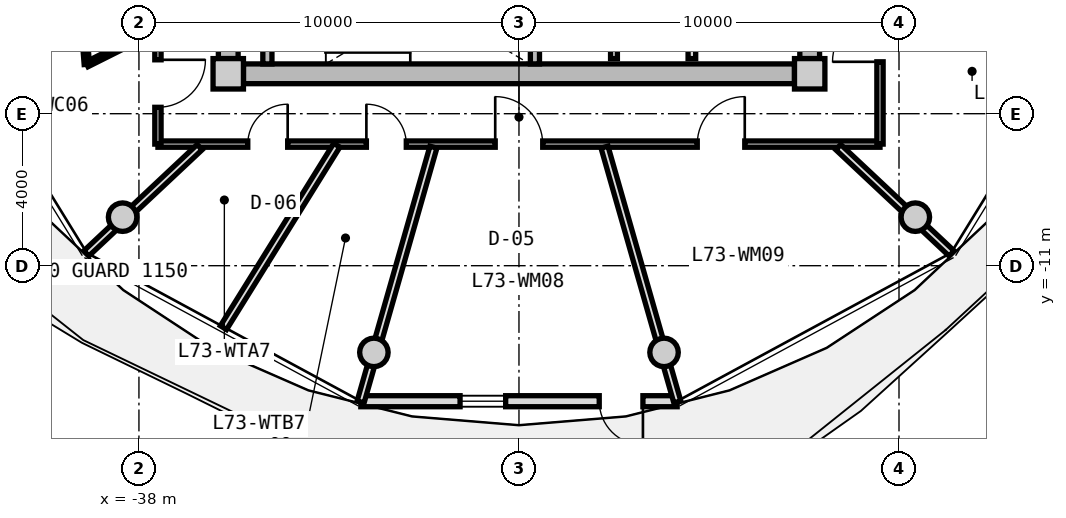
"""IFC4 building model, lengths in metres.
Left out: names, types, materials, properties, quantities, classifications, styles, units other than length and angle.
Written with IfcOpenShell. Run it as: python <this file> out.ifc"""

import sys

from ifc_helpers import new_model, si_unit, direction, frame, frame_2d, origin, origin_2d, place, context, subcontext, project, spatial, rectangle, circle, extrude, source, transform, mapped, element, fill, save


model = new_model("IFC4")
c1 = context("Model", 3, precision=1e-05, world=origin(), true_north=direction((0.0, 1.0)))
c2 = subcontext(c1, "Body", "Model", "MODEL_VIEW")
j1 = project(units=[si_unit("LENGTHUNIT", "METRE"), si_unit("PLANEANGLEUNIT", "RADIAN")], contexts=[c1])
p1 = place(None, origin())
s1 = spatial("IfcSite", under=j1, at=p1, CompositionType="ELEMENT")
p2 = place(p1, origin())
s2 = spatial("IfcBuilding", under=s1, at=p2, CompositionType="ELEMENT")
p3 = place(p2, frame((0.0, 0.0, 235.25)))
s3 = spatial("IfcBuildingStorey", under=s2, at=p3, CompositionType="ELEMENT", Elevation=235.25)
m1 = source(origin(), c2, "Body", "SweptSolid", [
    extrude(rectangle(XDim=0.8, YDim=0.8, at=origin_2d()), origin(), (0.0, 0.0, 1.0), 3.05),
])
for number, where, z_axis, x_axis in (
    (1, (-35.65, -5.95, 0.0), (0.0, 0.0, 1.0), (1.0, 0.0, 0.0)),
    (2, (-20.35, -5.95, 0.0), (0.0, 0.0, 1.0), (1.0, 0.0, 0.0)),
):
    element("IfcColumn", number, at=place(p3, frame(where, z_axis=z_axis, x_axis=x_axis)), inside=s3, PredefinedType="COLUMN", context=c2, shape_type="MappedRepresentation", body=[
        mapped(m1, transform((0.0, 0.0, 0.0), x_axis=(1.0, 0.0, 0.0), y_axis=(0.0, 1.0, 0.0), z_axis=(0.0, 0.0, 1.0), scale=1.0)),
    ])
m2 = source(origin(), c2, "Body", "SweptSolid", [
    extrude(rectangle(XDim=14.5, YDim=0.52, at=frame_2d((7.25, 0.0))), origin(), (0.0, 0.0, 1.0), 2.81),
])
p4 = place(p3, frame((-20.75, -5.95, 0.0), z_axis=(0.0, 0.0, 1.0), x_axis=(-1.0, 0.0, 0.0)))
e3 = element("IfcWall", 3, at=p4, inside=s3, PredefinedType="SHEAR", context=c2, shape_type="MappedRepresentation", body=[
    mapped(m2, transform((0.0, 0.0, 0.0), x_axis=(1.0, 0.0, 0.0), y_axis=(0.0, 1.0, 0.0), z_axis=(0.0, 0.0, 1.0), scale=1.0)),
])
m3 = source(origin(), c2, "Body", "SweptSolid", [
    extrude(rectangle(XDim=11.1, YDim=0.52, at=frame_2d((5.55, 0.0))), origin(), (0.0, 0.0, 1.0), 2.81),
])
p5 = place(p3, frame((-35.65, -5.55, 0.0), z_axis=(0.0, 0.0, 1.0), x_axis=(0.0, 1.0, 0.0)))
e4 = element("IfcWall", 4, at=p5, inside=s3, PredefinedType="SHEAR", context=c2, shape_type="MappedRepresentation", body=[
    mapped(m3, transform((0.0, 0.0, 0.0), x_axis=(1.0, 0.0, 0.0), y_axis=(0.0, 1.0, 0.0), z_axis=(0.0, 0.0, 1.0), scale=1.0)),
])
p6 = place(p5, frame((3.8, 0.0, 0.0)))
e5 = element("IfcOpeningElement", 5, at=p6, cuts=e4, PredefinedType="OPENING", context=c2, shape_type="SweptSolid", body=[
    extrude(rectangle(XDim=1.2, YDim=2.15, at=frame_2d((0.6, 1.075))), frame((0.0, 0.27, 0.0), z_axis=(0.0, -1.0, 0.0), x_axis=(1.0, 0.0, 0.0)), (0.0, 0.0, 1.0), 0.54),
])
p7 = place(p3, frame((-20.35, 5.55, 0.0), z_axis=(0.0, 0.0, 1.0), x_axis=(0.0, -1.0, 0.0)))
e6 = element("IfcWall", 6, at=p7, inside=s3, PredefinedType="SHEAR", context=c2, shape_type="MappedRepresentation", body=[
    mapped(m3, transform((0.0, 0.0, 0.0), x_axis=(1.0, 0.0, 0.0), y_axis=(0.0, 1.0, 0.0), z_axis=(0.0, 0.0, 1.0), scale=1.0)),
])
p8 = place(p7, frame((5.65, 0.0, 0.0)))
e7 = element("IfcOpeningElement", 7, at=p8, cuts=e6, PredefinedType="OPENING", context=c2, shape_type="SweptSolid", body=[
    extrude(rectangle(XDim=1.2, YDim=2.15, at=frame_2d((0.6, 1.075))), frame((0.0, 0.27, 0.0), z_axis=(0.0, -1.0, 0.0), x_axis=(1.0, 0.0, 0.0)), (0.0, 0.0, 1.0), 0.54),
])
m4 = source(origin(), c2, "Body", "SweptSolid", [
    extrude(circle(Radius=0.375, at=origin_2d()), origin(), (0.0, 0.0, 1.0), 3.05),
])
for number, where, z_axis, x_axis in (
    (8, (-38.43, -9.723, 0.0), (0.0, 0.0, 1.0), (1.0, 0.0, 0.0)),
    (9, (-31.818, -13.281, 0.0), (0.0, 0.0, 1.0), (1.0, 0.0, 0.0)),
    (10, (-24.182, -13.281, 0.0), (0.0, 0.0, 1.0), (1.0, 0.0, 0.0)),
    (11, (-17.57, -9.723, 0.0), (0.0, 0.0, 1.0), (1.0, 0.0, 0.0)),
):
    element("IfcColumn", number, at=place(p3, frame(where, z_axis=z_axis, x_axis=x_axis)), inside=s3, PredefinedType="COLUMN", context=c2, shape_type="MappedRepresentation", body=[
        mapped(m4, transform((0.0, 0.0, 0.0), x_axis=(1.0, 0.0, 0.0), y_axis=(0.0, 1.0, 0.0), z_axis=(0.0, 0.0, 1.0), scale=1.0)),
    ])
m5 = source(origin(), c2, "Body", "SweptSolid", [
    extrude(rectangle(XDim=8.324, YDim=0.29, at=frame_2d((4.162, 0.0))), origin(), (0.0, 0.0, 1.0), 2.81),
])
p9 = place(p3, frame((-23.838, -14.566, 0.0), z_axis=(0.0, 0.0, 1.0), x_axis=(-1.0, 0.0, 0.0)))
e12 = element("IfcWall", 12, at=p9, inside=s3, PredefinedType="SOLIDWALL", context=c2, shape_type="MappedRepresentation", body=[
    mapped(m5, transform((0.0, 0.0, 0.0), x_axis=(1.0, 0.0, 0.0), y_axis=(0.0, 1.0, 0.0), z_axis=(0.0, 0.0, 1.0), scale=1.0)),
])
p10 = place(p9, frame((0.9, 0.0, 0.0)))
e13 = element("IfcOpeningElement", 13, at=p10, cuts=e12, PredefinedType="OPENING", context=c2, shape_type="SweptSolid", body=[
    extrude(rectangle(XDim=1.15, YDim=2.25, at=frame_2d((0.575, 1.125))), frame((0.0, 0.155, 0.0), z_axis=(0.0, -1.0, 0.0), x_axis=(1.0, 0.0, 0.0)), (0.0, 0.0, 1.0), 0.31),
])
p11 = place(p9, frame((4.512, 0.0, 0.85)))
e14 = element("IfcOpeningElement", 14, at=p11, cuts=e12, PredefinedType="OPENING", context=c2, shape_type="SweptSolid", body=[
    extrude(rectangle(XDim=1.2, YDim=1.5, at=frame_2d((0.6, 0.75))), frame((0.0, 0.155, 0.0), z_axis=(0.0, -1.0, 0.0), x_axis=(1.0, 0.0, 0.0)), (0.0, 0.0, 1.0), 0.31),
])
m6 = source(origin(), c2, "Body", "SweptSolid", [
    extrude(rectangle(XDim=3.24, YDim=0.24, at=frame_2d((1.62, 0.0))), origin(), (0.0, 0.0, 1.0), 2.81),
])
for number, where, z_axis, x_axis in (
    (15, (-34.62, -5.69, 0.0), (0.0, 0.0, 1.0), (0.0, 1.0, 0.0)),
    (16, (-27.58, -5.69, 0.0), (0.0, 0.0, 1.0), (0.0, 1.0, 0.0)),
):
    element("IfcWall", number, at=place(p3, frame(where, z_axis=z_axis, x_axis=x_axis)), inside=s3, PredefinedType="PARTITIONING", context=c2, shape_type="MappedRepresentation", body=[
        mapped(m6, transform((0.0, 0.0, 0.0), x_axis=(1.0, 0.0, 0.0), y_axis=(0.0, 1.0, 0.0), z_axis=(0.0, 0.0, 1.0), scale=1.0)),
    ])
m7 = source(origin(), c2, "Body", "SweptSolid", [
    extrude(rectangle(XDim=3.8, YDim=0.2, at=frame_2d((1.9, 0.0))), origin(), (0.0, 0.0, 1.0), 2.795),
])
p12 = place(p3, frame((-23.45, -5.55, 0.0), z_axis=(0.0, 0.0, 1.0), x_axis=(0.0, 1.0, 0.0)))
e17 = element("IfcWall", 17, at=p12, inside=s3, PredefinedType="PARTITIONING", context=c2, shape_type="MappedRepresentation", body=[
    mapped(m7, transform((0.0, 0.0, 0.0), x_axis=(1.0, 0.0, 0.0), y_axis=(0.0, 1.0, 0.0), z_axis=(0.0, 0.0, 1.0), scale=1.0)),
])
m8 = source(origin(), c2, "Body", "SweptSolid", [
    extrude(rectangle(XDim=4.2, YDim=0.18, at=frame_2d((2.1, 0.0))), origin(), (0.0, 0.0, 1.0), 2.795),
])
p13 = place(p3, frame((-25.5, -5.55, 0.0), z_axis=(0.0, 0.0, 1.0), x_axis=(0.0, 1.0, 0.0)))
e18 = element("IfcWall", 18, at=p13, inside=s3, PredefinedType="PARTITIONING", context=c2, shape_type="MappedRepresentation", body=[
    mapped(m8, transform((0.0, 0.0, 0.0), x_axis=(1.0, 0.0, 0.0), y_axis=(0.0, 1.0, 0.0), z_axis=(0.0, 0.0, 1.0), scale=1.0)),
])
m9 = source(origin(), c2, "Body", "SweptSolid", [
    extrude(rectangle(XDim=19.0, YDim=0.165, at=frame_2d((9.5, 0.0))), origin(), (0.0, 0.0, 1.0), 2.795),
])
p14 = place(p3, frame((-18.5, -7.8, 0.0), z_axis=(0.0, 0.0, 1.0), x_axis=(-1.0, 0.0, 0.0)))
e19 = element("IfcWall", 19, at=p14, inside=s3, PredefinedType="PARTITIONING", context=c2, shape_type="MappedRepresentation", body=[
    mapped(m9, transform((0.0, 0.0, 0.0), x_axis=(1.0, 0.0, 0.0), y_axis=(0.0, 1.0, 0.0), z_axis=(0.0, 0.0, 1.0), scale=1.0)),
])
p15 = place(p14, frame((15.586, 0.0, 0.0)))
e20 = element("IfcOpeningElement", 20, at=p15, cuts=e19, PredefinedType="OPENING", context=c2, shape_type="SweptSolid", body=[
    extrude(rectangle(XDim=1.05, YDim=2.15, at=frame_2d((0.525, 1.075))), frame((0.0, 0.093, 0.0), z_axis=(0.0, -1.0, 0.0), x_axis=(1.0, 0.0, 0.0)), (0.0, 0.0, 1.0), 0.185),
])
p16 = place(p14, frame((12.465, 0.0, 0.0)))
e21 = element("IfcOpeningElement", 21, at=p16, cuts=e19, PredefinedType="OPENING", context=c2, shape_type="SweptSolid", body=[
    extrude(rectangle(XDim=1.05, YDim=2.15, at=frame_2d((0.525, 1.075))), frame((0.0, 0.093, 0.0), z_axis=(0.0, -1.0, 0.0), x_axis=(1.0, 0.0, 0.0)), (0.0, 0.0, 1.0), 0.185),
])
p17 = place(p14, frame((8.875, 0.0, 0.0)))
e22 = element("IfcOpeningElement", 22, at=p17, cuts=e19, PredefinedType="OPENING", context=c2, shape_type="SweptSolid", body=[
    extrude(rectangle(XDim=1.25, YDim=2.2, at=frame_2d((0.625, 1.1))), frame((0.0, 0.093, 0.0), z_axis=(0.0, -1.0, 0.0), x_axis=(1.0, 0.0, 0.0)), (0.0, 0.0, 1.0), 0.185),
])
p18 = place(p14, frame((3.559, 0.0, 0.0)))
e23 = element("IfcOpeningElement", 23, at=p18, cuts=e19, PredefinedType="OPENING", context=c2, shape_type="SweptSolid", body=[
    extrude(rectangle(XDim=1.25, YDim=2.2, at=frame_2d((0.625, 1.1))), frame((0.0, 0.093, 0.0), z_axis=(0.0, -1.0, 0.0), x_axis=(1.0, 0.0, 0.0)), (0.0, 0.0, 1.0), 0.185),
])
m10 = source(origin(), c2, "Body", "SweptSolid", [
    extrude(rectangle(XDim=6.88, YDim=0.165, at=frame_2d((3.44, 0.0))), origin(), (0.0, 0.0, 1.0), 2.795),
])
p19 = place(p3, frame((-37.5, -7.8, 0.0), z_axis=(0.0, 0.0, 1.0), x_axis=(0.0, 1.0, 0.0)))
e24 = element("IfcWall", 24, at=p19, inside=s3, PredefinedType="PARTITIONING", context=c2, shape_type="MappedRepresentation", body=[
    mapped(m10, transform((0.0, 0.0, 0.0), x_axis=(1.0, 0.0, 0.0), y_axis=(0.0, 1.0, 0.0), z_axis=(0.0, 0.0, 1.0), scale=1.0)),
])
p20 = place(p19, frame((0.968, 0.0, 0.0)))
e25 = element("IfcOpeningElement", 25, at=p20, cuts=e24, PredefinedType="OPENING", context=c2, shape_type="SweptSolid", body=[
    extrude(rectangle(XDim=1.25, YDim=2.2, at=frame_2d((0.625, 1.1))), frame((0.0, 0.093, 0.0), z_axis=(0.0, -1.0, 0.0), x_axis=(1.0, 0.0, 0.0)), (0.0, 0.0, 1.0), 0.185),
])
p21 = place(p3, frame((-18.5, -0.92, 0.0), z_axis=(0.0, 0.0, 1.0), x_axis=(0.0, -1.0, 0.0)))
e26 = element("IfcWall", 26, at=p21, inside=s3, PredefinedType="PARTITIONING", context=c2, shape_type="MappedRepresentation", body=[
    mapped(m10, transform((0.0, 0.0, 0.0), x_axis=(1.0, 0.0, 0.0), y_axis=(0.0, 1.0, 0.0), z_axis=(0.0, 0.0, 1.0), scale=1.0)),
])
p22 = place(p21, frame((3.464, 0.0, 0.0)))
e27 = element("IfcOpeningElement", 27, at=p22, cuts=e26, PredefinedType="OPENING", context=c2, shape_type="SweptSolid", body=[
    extrude(rectangle(XDim=1.25, YDim=2.2, at=frame_2d((0.625, 1.1))), frame((0.0, 0.093, 0.0), z_axis=(0.0, -1.0, 0.0), x_axis=(1.0, 0.0, 0.0)), (0.0, 0.0, 1.0), 0.185),
])
m11 = source(origin(), c2, "Body", "SweptSolid", [
    extrude(rectangle(XDim=4.089, YDim=0.19, at=frame_2d((2.044, 0.0))), origin(), (0.0, 0.0, 1.0), 2.395),
])
p23 = place(p3, frame((-36.402, -7.88, 0.0), z_axis=(0.0, 0.0, 1.0), x_axis=(-0.729401273609, -0.684086092577, 0.0)))
e28 = element("IfcWall", 28, at=p23, inside=s3, PredefinedType="PARTITIONING", context=c2, shape_type="MappedRepresentation", body=[
    mapped(m11, transform((0.0, 0.0, 0.0), x_axis=(1.0, 0.0, 0.0), y_axis=(0.0, 1.0, 0.0), z_axis=(0.0, 0.0, 1.0), scale=1.0)),
])
m12 = source(origin(), c2, "Body", "SweptSolid", [
    extrude(rectangle(XDim=2.06, YDim=0.14, at=frame_2d((1.03, 0.0))), origin(), (0.0, 0.0, 1.0), 2.795),
])
p24 = place(p3, frame((-37.53, -4.778, 0.0), z_axis=(0.0, 0.0, 1.0), x_axis=(-0.893952568722, -0.448161583444, 0.0)))
e29 = element("IfcWall", 29, at=p24, inside=s3, PredefinedType="PARTITIONING", context=c2, shape_type="MappedRepresentation", body=[
    mapped(m12, transform((0.0, 0.0, 0.0), x_axis=(1.0, 0.0, 0.0), y_axis=(0.0, 1.0, 0.0), z_axis=(0.0, 0.0, 1.0), scale=1.0)),
])
m13 = source(origin(), c2, "Body", "SweptSolid", [
    extrude(rectangle(XDim=2.798, YDim=0.14, at=frame_2d((1.399, 0.0))), origin(), (0.0, 0.0, 1.0), 2.795),
])
p25 = place(p3, frame((-39.371, -5.701, 0.0), z_axis=(0.0, 0.0, 1.0), x_axis=(-0.077823984089, 0.996967114553, 0.0)))
e30 = element("IfcWall", 30, at=p25, inside=s3, PredefinedType="PARTITIONING", context=c2, shape_type="MappedRepresentation", body=[
    mapped(m13, transform((0.0, 0.0, 0.0), x_axis=(1.0, 0.0, 0.0), y_axis=(0.0, 1.0, 0.0), z_axis=(0.0, 0.0, 1.0), scale=1.0)),
])
p26 = place(p25, frame((0.939, 0.0, 0.0)))
e31 = element("IfcOpeningElement", 31, at=p26, cuts=e30, PredefinedType="OPENING", context=c2, shape_type="SweptSolid", body=[
    extrude(rectangle(XDim=0.92, YDim=2.1, at=frame_2d((0.46, 1.05))), frame((0.0, 0.08, 0.0), z_axis=(0.0, -1.0, 0.0), x_axis=(1.0, 0.0, 0.0)), (0.0, 0.0, 1.0), 0.16),
])
m14 = source(origin(), c2, "Body", "SweptSolid", [
    extrude(rectangle(XDim=6.974, YDim=0.19, at=frame_2d((3.487, 0.0))), origin(), (0.0, 0.0, 1.0), 2.395),
])
p27 = place(p3, frame((-30.251, -7.88, 0.0), z_axis=(0.0, 0.0, 1.0), x_axis=(-0.274707256801, -0.961527910703, 0.0)))
e32 = element("IfcWall", 32, at=p27, inside=s3, PredefinedType="PARTITIONING", context=c2, shape_type="MappedRepresentation", body=[
    mapped(m14, transform((0.0, 0.0, 0.0), x_axis=(1.0, 0.0, 0.0), y_axis=(0.0, 1.0, 0.0), z_axis=(0.0, 0.0, 1.0), scale=1.0)),
])
m15 = source(origin(), c2, "Body", "SweptSolid", [
    extrude(rectangle(XDim=5.652, YDim=0.19, at=frame_2d((2.826, 0.0))), origin(), (0.0, 0.0, 1.0), 2.795),
])
p28 = place(p3, frame((-32.794, -7.83, 0.0), z_axis=(0.0, 0.0, 1.0), x_axis=(-0.527566076956, -0.84951399897, 0.0)))
e33 = element("IfcWall", 33, at=p28, inside=s3, PredefinedType="PARTITIONING", context=c2, shape_type="MappedRepresentation", body=[
    mapped(m15, transform((0.0, 0.0, 0.0), x_axis=(1.0, 0.0, 0.0), y_axis=(0.0, 1.0, 0.0), z_axis=(0.0, 0.0, 1.0), scale=1.0)),
])
p29 = place(p3, frame((-25.749, -7.88, 0.0), z_axis=(0.0, 0.0, 1.0), x_axis=(0.274707256801, -0.961527910703, 0.0)))
e34 = element("IfcWall", 34, at=p29, inside=s3, PredefinedType="PARTITIONING", context=c2, shape_type="MappedRepresentation", body=[
    mapped(m14, transform((0.0, 0.0, 0.0), x_axis=(1.0, 0.0, 0.0), y_axis=(0.0, 1.0, 0.0), z_axis=(0.0, 0.0, 1.0), scale=1.0)),
])
p30 = place(p3, frame((-19.598, -7.88, 0.0), z_axis=(0.0, 0.0, 1.0), x_axis=(0.729401273609, -0.684086092577, 0.0)))
e35 = element("IfcWall", 35, at=p30, inside=s3, PredefinedType="PARTITIONING", context=c2, shape_type="MappedRepresentation", body=[
    mapped(m11, transform((0.0, 0.0, 0.0), x_axis=(1.0, 0.0, 0.0), y_axis=(0.0, 1.0, 0.0), z_axis=(0.0, 0.0, 1.0), scale=1.0)),
])
m16 = source(origin(), c2, "Body", "SweptSolid", [
    extrude(rectangle(XDim=1.15, YDim=2.25, at=frame_2d((0.575, 1.125))), frame((0.0, 0.025, 0.0), z_axis=(0.0, -1.0, 0.0), x_axis=(1.0, 0.0, 0.0)), (0.0, 0.0, 1.0), 0.05),
])
p31 = place(p10, origin())
e36 = element("IfcDoor", 36, at=p31, inside=s3, OperationType="SINGLE_SWING_LEFT", PredefinedType="DOOR", context=c2, shape_type="MappedRepresentation", body=[
    mapped(m16, transform((0.0, 0.0, 0.0), x_axis=(1.0, 0.0, 0.0), y_axis=(0.0, 1.0, 0.0), z_axis=(0.0, 0.0, 1.0), scale=1.0)),
])
fill(e13, e36)
m17 = source(origin(), c2, "Body", "SweptSolid", [
    extrude(rectangle(XDim=1.2, YDim=1.5, at=frame_2d((0.6, 0.75))), frame((0.0, 0.03, 0.0), z_axis=(0.0, -1.0, 0.0), x_axis=(1.0, 0.0, 0.0)), (0.0, 0.0, 1.0), 0.06),
])
p32 = place(p11, origin())
e37 = element("IfcWindow", 37, at=p32, inside=s3, PartitioningType="SINGLE_PANEL", PredefinedType="WINDOW", context=c2, shape_type="MappedRepresentation", body=[
    mapped(m17, transform((0.0, 0.0, 0.0), x_axis=(1.0, 0.0, 0.0), y_axis=(0.0, 1.0, 0.0), z_axis=(0.0, 0.0, 1.0), scale=1.0)),
])
fill(e14, e37)
m18 = source(origin(), c2, "Body", "SweptSolid", [
    extrude(rectangle(XDim=1.25, YDim=2.2, at=frame_2d((0.625, 1.1))), frame((0.0, 0.025, 0.0), z_axis=(0.0, -1.0, 0.0), x_axis=(1.0, 0.0, 0.0)), (0.0, 0.0, 1.0), 0.05),
])
p33 = place(p20, frame((1.25, 0.0, 0.0), z_axis=(0.0, 0.0, 1.0), x_axis=(-1.0, 0.0, 0.0)))
e38 = element("IfcDoor", 38, at=p33, inside=s3, OperationType="SINGLE_SWING_LEFT", PredefinedType="DOOR", context=c2, shape_type="MappedRepresentation", body=[
    mapped(m18, transform((0.0, 0.0, 0.0), x_axis=(1.0, 0.0, 0.0), y_axis=(0.0, 1.0, 0.0), z_axis=(0.0, 0.0, 1.0), scale=1.0)),
])
fill(e25, e38)
m19 = source(origin(), c2, "Body", "SweptSolid", [
    extrude(rectangle(XDim=1.05, YDim=2.15, at=frame_2d((0.525, 1.075))), frame((0.0, 0.025, 0.0), z_axis=(0.0, -1.0, 0.0), x_axis=(1.0, 0.0, 0.0)), (0.0, 0.0, 1.0), 0.05),
])
p34 = place(p15, frame((1.05, 0.0, 0.0), z_axis=(0.0, 0.0, 1.0), x_axis=(-1.0, 0.0, 0.0)))
e39 = element("IfcDoor", 39, at=p34, inside=s3, OperationType="SINGLE_SWING_RIGHT", PredefinedType="DOOR", context=c2, shape_type="MappedRepresentation", body=[
    mapped(m19, transform((0.0, 0.0, 0.0), x_axis=(1.0, 0.0, 0.0), y_axis=(0.0, 1.0, 0.0), z_axis=(0.0, 0.0, 1.0), scale=1.0)),
])
fill(e20, e39)
p35 = place(p16, frame((1.05, 0.0, 0.0), z_axis=(0.0, 0.0, 1.0), x_axis=(-1.0, 0.0, 0.0)))
e40 = element("IfcDoor", 40, at=p35, inside=s3, OperationType="SINGLE_SWING_LEFT", PredefinedType="DOOR", context=c2, shape_type="MappedRepresentation", body=[
    mapped(m19, transform((0.0, 0.0, 0.0), x_axis=(1.0, 0.0, 0.0), y_axis=(0.0, 1.0, 0.0), z_axis=(0.0, 0.0, 1.0), scale=1.0)),
])
fill(e21, e40)
p36 = place(p17, frame((1.25, 0.0, 0.0), z_axis=(0.0, 0.0, 1.0), x_axis=(-1.0, 0.0, 0.0)))
e41 = element("IfcDoor", 41, at=p36, inside=s3, OperationType="SINGLE_SWING_LEFT", PredefinedType="DOOR", context=c2, shape_type="MappedRepresentation", body=[
    mapped(m18, transform((0.0, 0.0, 0.0), x_axis=(1.0, 0.0, 0.0), y_axis=(0.0, 1.0, 0.0), z_axis=(0.0, 0.0, 1.0), scale=1.0)),
])
fill(e22, e41)
p37 = place(p18, frame((1.25, 0.0, 0.0), z_axis=(0.0, 0.0, 1.0), x_axis=(-1.0, 0.0, 0.0)))
e42 = element("IfcDoor", 42, at=p37, inside=s3, OperationType="SINGLE_SWING_RIGHT", PredefinedType="DOOR", context=c2, shape_type="MappedRepresentation", body=[
    mapped(m18, transform((0.0, 0.0, 0.0), x_axis=(1.0, 0.0, 0.0), y_axis=(0.0, 1.0, 0.0), z_axis=(0.0, 0.0, 1.0), scale=1.0)),
])
fill(e23, e42)
p38 = place(p22, frame((1.25, 0.0, 0.0), z_axis=(0.0, 0.0, 1.0), x_axis=(-1.0, 0.0, 0.0)))
e43 = element("IfcDoor", 43, at=p38, inside=s3, OperationType="SINGLE_SWING_LEFT", PredefinedType="DOOR", context=c2, shape_type="MappedRepresentation", body=[
    mapped(m18, transform((0.0, 0.0, 0.0), x_axis=(1.0, 0.0, 0.0), y_axis=(0.0, 1.0, 0.0), z_axis=(0.0, 0.0, 1.0), scale=1.0)),
])
fill(e27, e43)
save(model, sys.argv[1])
